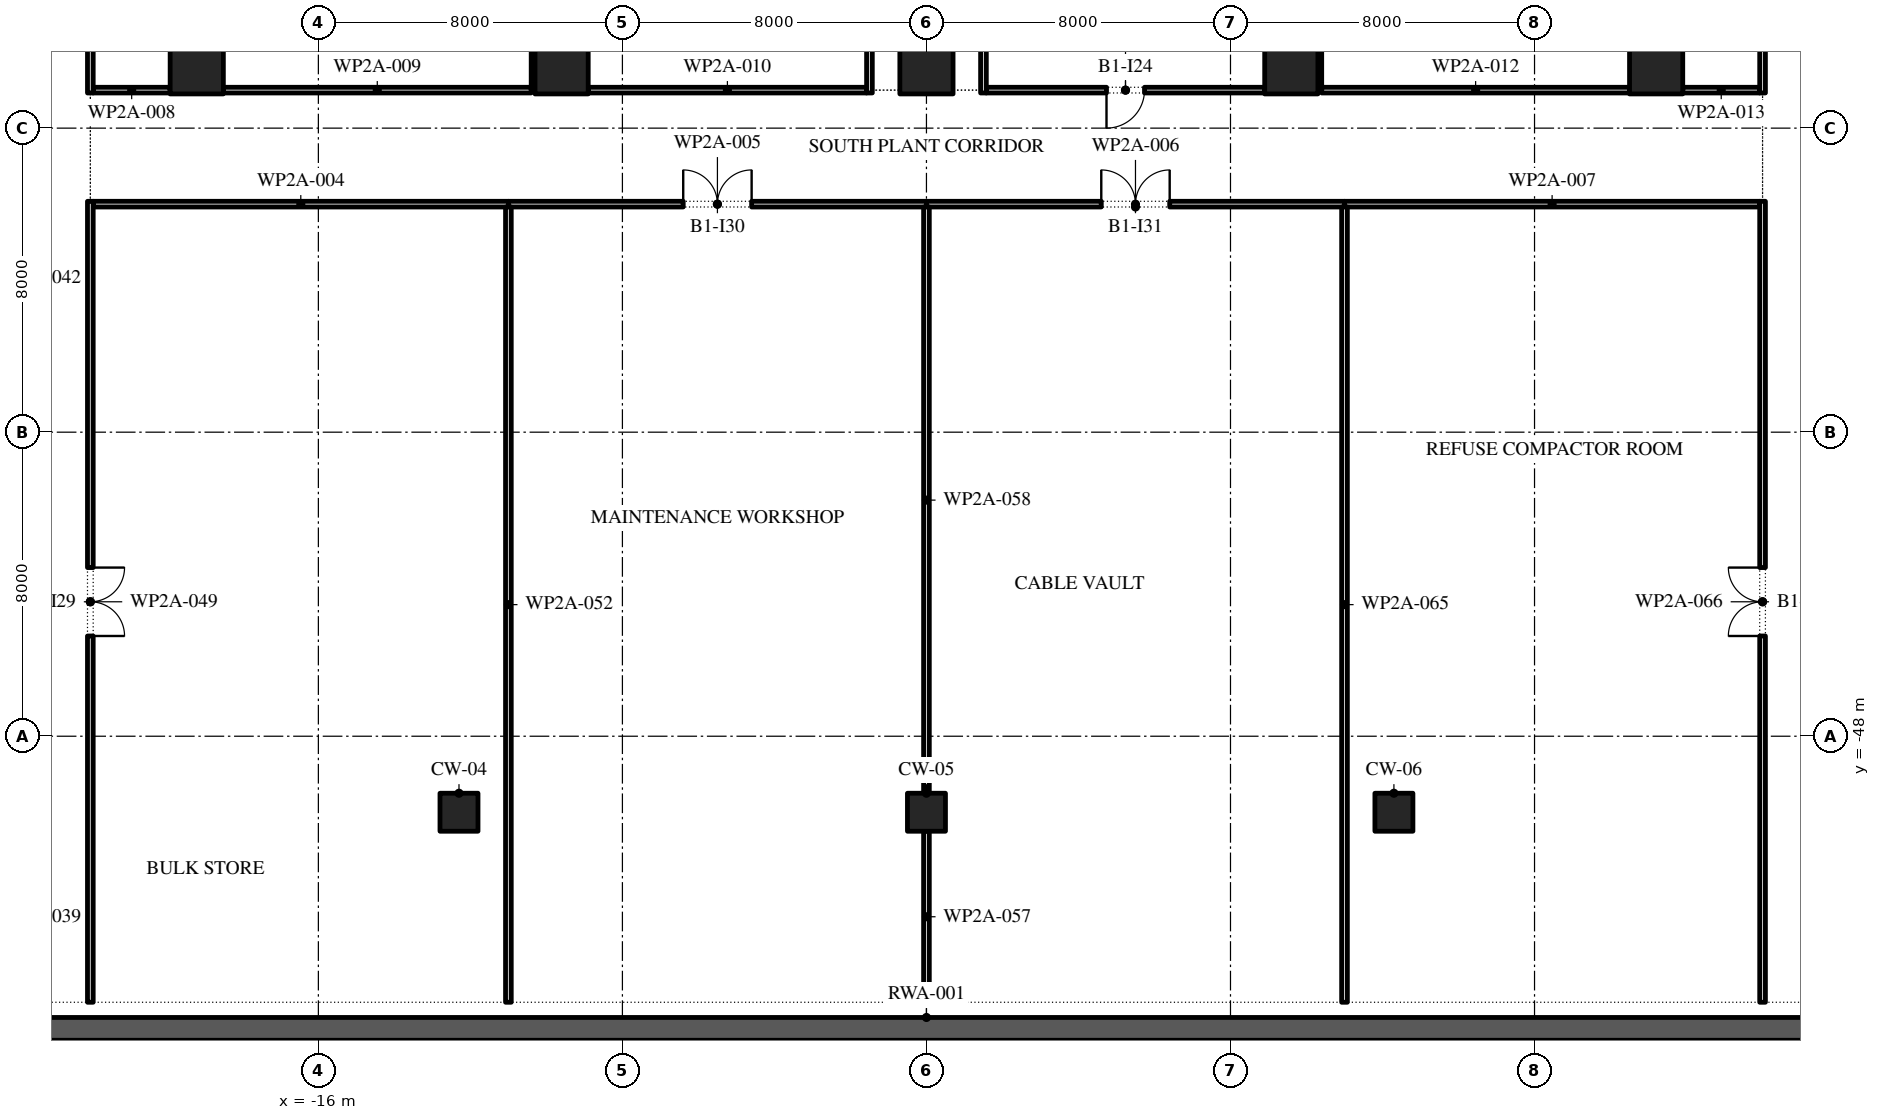
"""IFC4 building model, lengths in metres.
Left out: names, types, materials, properties, quantities, classifications, styles, units other than length and angle.
Written with IfcOpenShell. Run it as: python <this file> out.ifc"""

import sys

from ifc_helpers import new_model, si_unit, direction, frame, frame_2d, origin, origin_2d, place, context, subcontext, project, spatial, rectangle, extrude, element, fill, save


model = new_model("IFC4")
c1 = context("Model", 3, precision=1e-05, world=origin(), true_north=direction((0.0, 1.0)))
c2 = subcontext(c1, "Body", "Model", "MODEL_VIEW")
j1 = project(units=[si_unit("LENGTHUNIT", "METRE"), si_unit("PLANEANGLEUNIT", "RADIAN")], contexts=[c1])
p1 = place(None, origin())
s1 = spatial("IfcSite", under=j1, at=p1, CompositionType="ELEMENT")
p2 = place(p1, origin())
s2 = spatial("IfcBuilding", under=s1, at=p2, CompositionType="ELEMENT")
p3 = place(p2, frame((0.0, 0.0, -5.2)))
s3 = spatial("IfcBuildingStorey", under=s2, at=p3, CompositionType="ELEMENT", Elevation=-5.2)
p4 = place(p3, frame((-48.0, -55.7, 0.0), z_axis=(0.0, 0.0, 1.0), x_axis=(1.0, 0.0, 0.0)))
e1 = element("IfcWall", 1, at=p4, inside=s3, PredefinedType="SOLIDWALL", context=c2, shape_type="SweptSolid", body=[
    extrude(rectangle(XDim=96.0, YDim=0.6, at=frame_2d((48.0, 0.0))), origin(), (0.0, 0.0, 1.0), 4.8),
])
for number, where, z_axis, x_axis in (
    (2, (-12.3, -50.0, 0.0), (0.0, 0.0, 1.0), (1.0, 0.0, 0.0)),
    (3, (0.0, -50.0, 0.0), (0.0, 0.0, 1.0), (1.0, 0.0, 0.0)),
    (4, (12.3, -50.0, 0.0), (0.0, 0.0, 1.0), (1.0, 0.0, 0.0)),
):
    element("IfcColumn", number, at=place(p3, frame(where, z_axis=z_axis, x_axis=x_axis)), inside=s3, PredefinedType="COLUMN", context=c2, shape_type="SweptSolid", body=[
        extrude(rectangle(XDim=1.0, YDim=1.0, at=origin_2d()), origin(), (0.0, 0.0, 1.0), 5.2),
    ])
for number, where, z_axis, x_axis in (
    (5, (-19.2, -30.4, 0.0), (0.0, 0.0, 1.0), (1.0, 0.0, 0.0)),
    (6, (-9.6, -30.4, 0.0), (0.0, 0.0, 1.0), (1.0, 0.0, 0.0)),
    (7, (0.0, -30.4, 0.0), (0.0, 0.0, 1.0), (1.0, 0.0, 0.0)),
    (8, (9.6, -30.4, 0.0), (0.0, 0.0, 1.0), (1.0, 0.0, 0.0)),
    (9, (19.2, -30.4, 0.0), (0.0, 0.0, 1.0), (1.0, 0.0, 0.0)),
):
    element("IfcColumn", number, at=place(p3, frame(where, z_axis=z_axis, x_axis=x_axis)), inside=s3, PredefinedType="COLUMN", context=c2, shape_type="SweptSolid", body=[
        extrude(rectangle(XDim=1.4, YDim=1.4, at=origin_2d()), origin(), (0.0, 0.0, 1.0), 5.2),
    ])
for number, where, z_axis, x_axis in (
    (10, (-10.2, -31.0, 0.0), (0.0, 0.0, 1.0), (0.0, 1.0, 0.0)),
    (11, (10.2, -31.0, 0.0), (0.0, 0.0, 1.0), (0.0, 1.0, 0.0)),
):
    element("IfcWall", number, at=place(p3, frame(where, z_axis=z_axis, x_axis=x_axis)), inside=s3, PredefinedType="SHEAR", context=c2, shape_type="SweptSolid", body=[
        extrude(rectangle(XDim=15.0, YDim=0.4, at=frame_2d((7.5, 0.0))), origin(), (0.0, 0.0, 1.0), 4.9),
    ])
p5 = place(p3, frame((-21.925, -34.0, 0.0), z_axis=(0.0, 0.0, 1.0), x_axis=(1.0, 0.0, 0.0)))
e12 = element("IfcWall", 12, at=p5, inside=s3, PredefinedType="PARTITIONING", context=c2, shape_type="SweptSolid", body=[
    extrude(rectangle(XDim=10.925, YDim=0.15, at=frame_2d((5.462, 0.0))), origin(), (0.0, 0.0, 1.0), 4.9),
])
p6 = place(p3, frame((-11.0, -34.0, 0.0), z_axis=(0.0, 0.0, 1.0), x_axis=(1.0, 0.0, 0.0)))
e13 = element("IfcWall", 13, at=p6, inside=s3, PredefinedType="PARTITIONING", context=c2, shape_type="SweptSolid", body=[
    extrude(rectangle(XDim=11.0, YDim=0.15, at=frame_2d((5.5, 0.0))), origin(), (0.0, 0.0, 1.0), 4.9),
])
p7 = place(p6, frame((4.6, 0.0, 0.0)))
e14 = element("IfcOpeningElement", 14, at=p7, cuts=e13, PredefinedType="OPENING", context=c2, shape_type="SweptSolid", body=[
    extrude(rectangle(XDim=1.8, YDim=2.1, at=frame_2d((0.9, 1.05))), frame((0.0, 0.085, 0.0), z_axis=(0.0, -1.0, 0.0), x_axis=(1.0, 0.0, 0.0)), (0.0, 0.0, 1.0), 0.17),
])
p8 = place(p3, frame((0.0, -34.0, 0.0), z_axis=(0.0, 0.0, 1.0), x_axis=(1.0, 0.0, 0.0)))
e15 = element("IfcWall", 15, at=p8, inside=s3, PredefinedType="PARTITIONING", context=c2, shape_type="SweptSolid", body=[
    extrude(rectangle(XDim=11.0, YDim=0.15, at=frame_2d((5.5, 0.0))), origin(), (0.0, 0.0, 1.0), 4.9),
])
p9 = place(p8, frame((4.6, 0.0, 0.0)))
e16 = element("IfcOpeningElement", 16, at=p9, cuts=e15, PredefinedType="OPENING", context=c2, shape_type="SweptSolid", body=[
    extrude(rectangle(XDim=1.8, YDim=2.1, at=frame_2d((0.9, 1.05))), frame((0.0, 0.085, 0.0), z_axis=(0.0, -1.0, 0.0), x_axis=(1.0, 0.0, 0.0)), (0.0, 0.0, 1.0), 0.17),
])
p10 = place(p3, frame((11.0, -34.0, 0.0), z_axis=(0.0, 0.0, 1.0), x_axis=(1.0, 0.0, 0.0)))
e17 = element("IfcWall", 17, at=p10, inside=s3, PredefinedType="PARTITIONING", context=c2, shape_type="SweptSolid", body=[
    extrude(rectangle(XDim=10.925, YDim=0.15, at=frame_2d((5.462, 0.0))), origin(), (0.0, 0.0, 1.0), 4.9),
])
p11 = place(p3, frame((-21.925, -31.0, 0.0), z_axis=(0.0, 0.0, 1.0), x_axis=(1.0, 0.0, 0.0)))
e18 = element("IfcWall", 18, at=p11, inside=s3, PredefinedType="PARTITIONING", context=c2, shape_type="SweptSolid", body=[
    extrude(rectangle(XDim=2.025, YDim=0.15, at=frame_2d((1.013, 0.0))), origin(), (0.0, 0.0, 1.0), 4.9),
])
p12 = place(p3, frame((-18.5, -31.0, 0.0), z_axis=(0.0, 0.0, 1.0), x_axis=(1.0, 0.0, 0.0)))
e19 = element("IfcWall", 19, at=p12, inside=s3, PredefinedType="PARTITIONING", context=c2, shape_type="SweptSolid", body=[
    extrude(rectangle(XDim=8.1, YDim=0.15, at=frame_2d((4.05, 0.0))), origin(), (0.0, 0.0, 1.0), 4.9),
])
p13 = place(p3, frame((-8.9, -31.0, 0.0), z_axis=(0.0, 0.0, 1.0), x_axis=(1.0, 0.0, 0.0)))
e20 = element("IfcWall", 20, at=p13, inside=s3, PredefinedType="PARTITIONING", context=c2, shape_type="SweptSolid", body=[
    extrude(rectangle(XDim=7.325, YDim=0.15, at=frame_2d((3.663, 0.0))), origin(), (0.0, 0.0, 1.0), 4.9),
])
p14 = place(p3, frame((1.575, -31.0, 0.0), z_axis=(0.0, 0.0, 1.0), x_axis=(1.0, 0.0, 0.0)))
e21 = element("IfcWall", 21, at=p14, inside=s3, PredefinedType="PARTITIONING", context=c2, shape_type="SweptSolid", body=[
    extrude(rectangle(XDim=7.325, YDim=0.15, at=frame_2d((3.663, 0.0))), origin(), (0.0, 0.0, 1.0), 4.9),
])
p15 = place(p14, frame((3.163, 0.0, 0.0)))
e22 = element("IfcOpeningElement", 22, at=p15, cuts=e21, PredefinedType="OPENING", context=c2, shape_type="SweptSolid", body=[
    extrude(rectangle(XDim=1.0, YDim=2.1, at=frame_2d((0.5, 1.05))), frame((0.0, 0.085, 0.0), z_axis=(0.0, -1.0, 0.0), x_axis=(1.0, 0.0, 0.0)), (0.0, 0.0, 1.0), 0.17),
])
p16 = place(p3, frame((10.4, -31.0, 0.0), z_axis=(0.0, 0.0, 1.0), x_axis=(1.0, 0.0, 0.0)))
e23 = element("IfcWall", 23, at=p16, inside=s3, PredefinedType="PARTITIONING", context=c2, shape_type="SweptSolid", body=[
    extrude(rectangle(XDim=8.1, YDim=0.15, at=frame_2d((4.05, 0.0))), origin(), (0.0, 0.0, 1.0), 4.9),
])
p17 = place(p3, frame((19.9, -31.0, 0.0), z_axis=(0.0, 0.0, 1.0), x_axis=(1.0, 0.0, 0.0)))
e24 = element("IfcWall", 24, at=p17, inside=s3, PredefinedType="PARTITIONING", context=c2, shape_type="SweptSolid", body=[
    extrude(rectangle(XDim=2.025, YDim=0.15, at=frame_2d((1.013, 0.0))), origin(), (0.0, 0.0, 1.0), 4.9),
])
p18 = place(p3, frame((-22.0, -55.0, 0.0), z_axis=(0.0, 0.0, 1.0), x_axis=(0.0, 1.0, 0.0)))
e25 = element("IfcWall", 25, at=p18, inside=s3, PredefinedType="PARTITIONING", context=c2, shape_type="SweptSolid", body=[
    extrude(rectangle(XDim=21.075, YDim=0.15, at=frame_2d((10.538, 0.0))), origin(), (0.0, 0.0, 1.0), 4.9),
])
p19 = place(p18, frame((9.637, 0.0, 0.0)))
e26 = element("IfcOpeningElement", 26, at=p19, cuts=e25, PredefinedType="OPENING", context=c2, shape_type="SweptSolid", body=[
    extrude(rectangle(XDim=1.8, YDim=2.1, at=frame_2d((0.9, 1.05))), frame((0.0, 0.085, 0.0), z_axis=(0.0, -1.0, 0.0), x_axis=(1.0, 0.0, 0.0)), (0.0, 0.0, 1.0), 0.17),
])
p20 = place(p3, frame((-22.0, -31.075, 0.0), z_axis=(0.0, 0.0, 1.0), x_axis=(0.0, 1.0, 0.0)))
e27 = element("IfcWall", 27, at=p20, inside=s3, PredefinedType="PARTITIONING", context=c2, shape_type="SweptSolid", body=[
    extrude(rectangle(XDim=14.075, YDim=0.15, at=frame_2d((7.038, 0.0))), origin(), (0.0, 0.0, 1.0), 4.9),
])
p21 = place(p20, frame((2.619, 0.0, 0.0)))
e28 = element("IfcOpeningElement", 28, at=p21, cuts=e27, PredefinedType="OPENING", context=c2, shape_type="SweptSolid", body=[
    extrude(rectangle(XDim=1.8, YDim=2.1, at=frame_2d((0.9, 1.05))), frame((0.0, 0.085, 0.0), z_axis=(0.0, -1.0, 0.0), x_axis=(1.0, 0.0, 0.0)), (0.0, 0.0, 1.0), 0.17),
])
p22 = place(p3, frame((-11.0, -55.0, 0.0), z_axis=(0.0, 0.0, 1.0), x_axis=(0.0, 1.0, 0.0)))
e29 = element("IfcWall", 29, at=p22, inside=s3, PredefinedType="PARTITIONING", context=c2, shape_type="SweptSolid", body=[
    extrude(rectangle(XDim=20.925, YDim=0.15, at=frame_2d((10.462, 0.0))), origin(), (0.0, 0.0, 1.0), 4.9),
])
p23 = place(p3, frame((-1.5, -31.075, 0.0), z_axis=(0.0, 0.0, 1.0), x_axis=(0.0, 1.0, 0.0)))
e30 = element("IfcWall", 30, at=p23, inside=s3, PredefinedType="PARTITIONING", context=c2, shape_type="SweptSolid", body=[
    extrude(rectangle(XDim=12.075, YDim=0.15, at=frame_2d((6.038, 0.0))), origin(), (0.0, 0.0, 1.0), 4.9),
])
p24 = place(p23, frame((5.538, 0.0, 0.0)))
e31 = element("IfcOpeningElement", 31, at=p24, cuts=e30, PredefinedType="OPENING", context=c2, shape_type="SweptSolid", body=[
    extrude(rectangle(XDim=1.0, YDim=2.1, at=frame_2d((0.5, 1.05))), frame((0.0, 0.085, 0.0), z_axis=(0.0, -1.0, 0.0), x_axis=(1.0, 0.0, 0.0)), (0.0, 0.0, 1.0), 0.17),
])
p25 = place(p3, frame((0.0, -55.0, 0.0), z_axis=(0.0, 0.0, 1.0), x_axis=(0.0, 1.0, 0.0)))
e32 = element("IfcWall", 32, at=p25, inside=s3, PredefinedType="PARTITIONING", context=c2, shape_type="SweptSolid", body=[
    extrude(rectangle(XDim=4.5, YDim=0.15, at=frame_2d((2.25, 0.0))), origin(), (0.0, 0.0, 1.0), 4.9),
])
p26 = place(p3, frame((0.0, -49.5, 0.0), z_axis=(0.0, 0.0, 1.0), x_axis=(0.0, 1.0, 0.0)))
e33 = element("IfcWall", 33, at=p26, inside=s3, PredefinedType="PARTITIONING", context=c2, shape_type="SweptSolid", body=[
    extrude(rectangle(XDim=15.425, YDim=0.15, at=frame_2d((7.712, 0.0))), origin(), (0.0, 0.0, 1.0), 4.9),
])
p27 = place(p3, frame((1.5, -31.075, 0.0), z_axis=(0.0, 0.0, 1.0), x_axis=(0.0, 1.0, 0.0)))
e34 = element("IfcWall", 34, at=p27, inside=s3, PredefinedType="PARTITIONING", context=c2, shape_type="SweptSolid", body=[
    extrude(rectangle(XDim=7.075, YDim=0.15, at=frame_2d((3.538, 0.0))), origin(), (0.0, 0.0, 1.0), 4.9),
])
p28 = place(p3, frame((11.0, -55.0, 0.0), z_axis=(0.0, 0.0, 1.0), x_axis=(0.0, 1.0, 0.0)))
e35 = element("IfcWall", 35, at=p28, inside=s3, PredefinedType="PARTITIONING", context=c2, shape_type="SweptSolid", body=[
    extrude(rectangle(XDim=20.925, YDim=0.15, at=frame_2d((10.462, 0.0))), origin(), (0.0, 0.0, 1.0), 4.9),
])
p29 = place(p3, frame((22.0, -55.0, 0.0), z_axis=(0.0, 0.0, 1.0), x_axis=(0.0, 1.0, 0.0)))
e36 = element("IfcWall", 36, at=p29, inside=s3, PredefinedType="PARTITIONING", context=c2, shape_type="SweptSolid", body=[
    extrude(rectangle(XDim=21.075, YDim=0.15, at=frame_2d((10.538, 0.0))), origin(), (0.0, 0.0, 1.0), 4.9),
])
p30 = place(p29, frame((9.637, 0.0, 0.0)))
e37 = element("IfcOpeningElement", 37, at=p30, cuts=e36, PredefinedType="OPENING", context=c2, shape_type="SweptSolid", body=[
    extrude(rectangle(XDim=1.8, YDim=2.1, at=frame_2d((0.9, 1.05))), frame((0.0, 0.085, 0.0), z_axis=(0.0, -1.0, 0.0), x_axis=(1.0, 0.0, 0.0)), (0.0, 0.0, 1.0), 0.17),
])
p31 = place(p3, frame((22.0, -31.075, 0.0), z_axis=(0.0, 0.0, 1.0), x_axis=(0.0, 1.0, 0.0)))
e38 = element("IfcWall", 38, at=p31, inside=s3, PredefinedType="PARTITIONING", context=c2, shape_type="SweptSolid", body=[
    extrude(rectangle(XDim=14.075, YDim=0.15, at=frame_2d((7.038, 0.0))), origin(), (0.0, 0.0, 1.0), 4.9),
])
p32 = place(p31, frame((6.137, 0.0, 0.0)))
e39 = element("IfcOpeningElement", 39, at=p32, cuts=e38, PredefinedType="OPENING", context=c2, shape_type="SweptSolid", body=[
    extrude(rectangle(XDim=1.8, YDim=2.1, at=frame_2d((0.9, 1.05))), frame((0.0, 0.085, 0.0), z_axis=(0.0, -1.0, 0.0), x_axis=(1.0, 0.0, 0.0)), (0.0, 0.0, 1.0), 0.17),
])
p33 = place(p15, frame((1.0, 0.0, 0.0), z_axis=(0.0, 0.0, 1.0), x_axis=(-1.0, 0.0, 0.0)))
e40 = element("IfcDoor", 40, at=p33, inside=s3, OperationType="SINGLE_SWING_LEFT", PredefinedType="DOOR", context=c2, shape_type="SweptSolid", body=[
    extrude(rectangle(XDim=1.0, YDim=2.1, at=frame_2d((0.5, 1.05))), frame((0.0, 0.025, 0.0), z_axis=(0.0, -1.0, 0.0), x_axis=(1.0, 0.0, 0.0)), (0.0, 0.0, 1.0), 0.05),
])
fill(e22, e40)
p34 = place(p19, frame((1.8, 0.0, 0.0), z_axis=(0.0, 0.0, 1.0), x_axis=(-1.0, 0.0, 0.0)))
e41 = element("IfcDoor", 41, at=p34, inside=s3, OperationType="SINGLE_SWING_RIGHT", PredefinedType="DOOR", context=c2, shape_type="SweptSolid", body=[
    extrude(rectangle(XDim=1.8, YDim=2.1, at=frame_2d((0.9, 1.05))), frame((0.0, 0.025, 0.0), z_axis=(0.0, -1.0, 0.0), x_axis=(1.0, 0.0, 0.0)), (0.0, 0.0, 1.0), 0.05),
])
fill(e26, e41)
p35 = place(p7, origin())
e42 = element("IfcDoor", 42, at=p35, inside=s3, OperationType="SINGLE_SWING_RIGHT", PredefinedType="DOOR", context=c2, shape_type="SweptSolid", body=[
    extrude(rectangle(XDim=1.8, YDim=2.1, at=frame_2d((0.9, 1.05))), frame((0.0, 0.025, 0.0), z_axis=(0.0, -1.0, 0.0), x_axis=(1.0, 0.0, 0.0)), (0.0, 0.0, 1.0), 0.05),
])
fill(e14, e42)
p36 = place(p9, origin())
e43 = element("IfcDoor", 43, at=p36, inside=s3, OperationType="SINGLE_SWING_RIGHT", PredefinedType="DOOR", context=c2, shape_type="SweptSolid", body=[
    extrude(rectangle(XDim=1.8, YDim=2.1, at=frame_2d((0.9, 1.05))), frame((0.0, 0.025, 0.0), z_axis=(0.0, -1.0, 0.0), x_axis=(1.0, 0.0, 0.0)), (0.0, 0.0, 1.0), 0.05),
])
fill(e16, e43)
p37 = place(p30, origin())
e44 = element("IfcDoor", 44, at=p37, inside=s3, OperationType="SINGLE_SWING_RIGHT", PredefinedType="DOOR", context=c2, shape_type="SweptSolid", body=[
    extrude(rectangle(XDim=1.8, YDim=2.1, at=frame_2d((0.9, 1.05))), frame((0.0, 0.025, 0.0), z_axis=(0.0, -1.0, 0.0), x_axis=(1.0, 0.0, 0.0)), (0.0, 0.0, 1.0), 0.05),
])
fill(e37, e44)
save(model, sys.argv[1])
